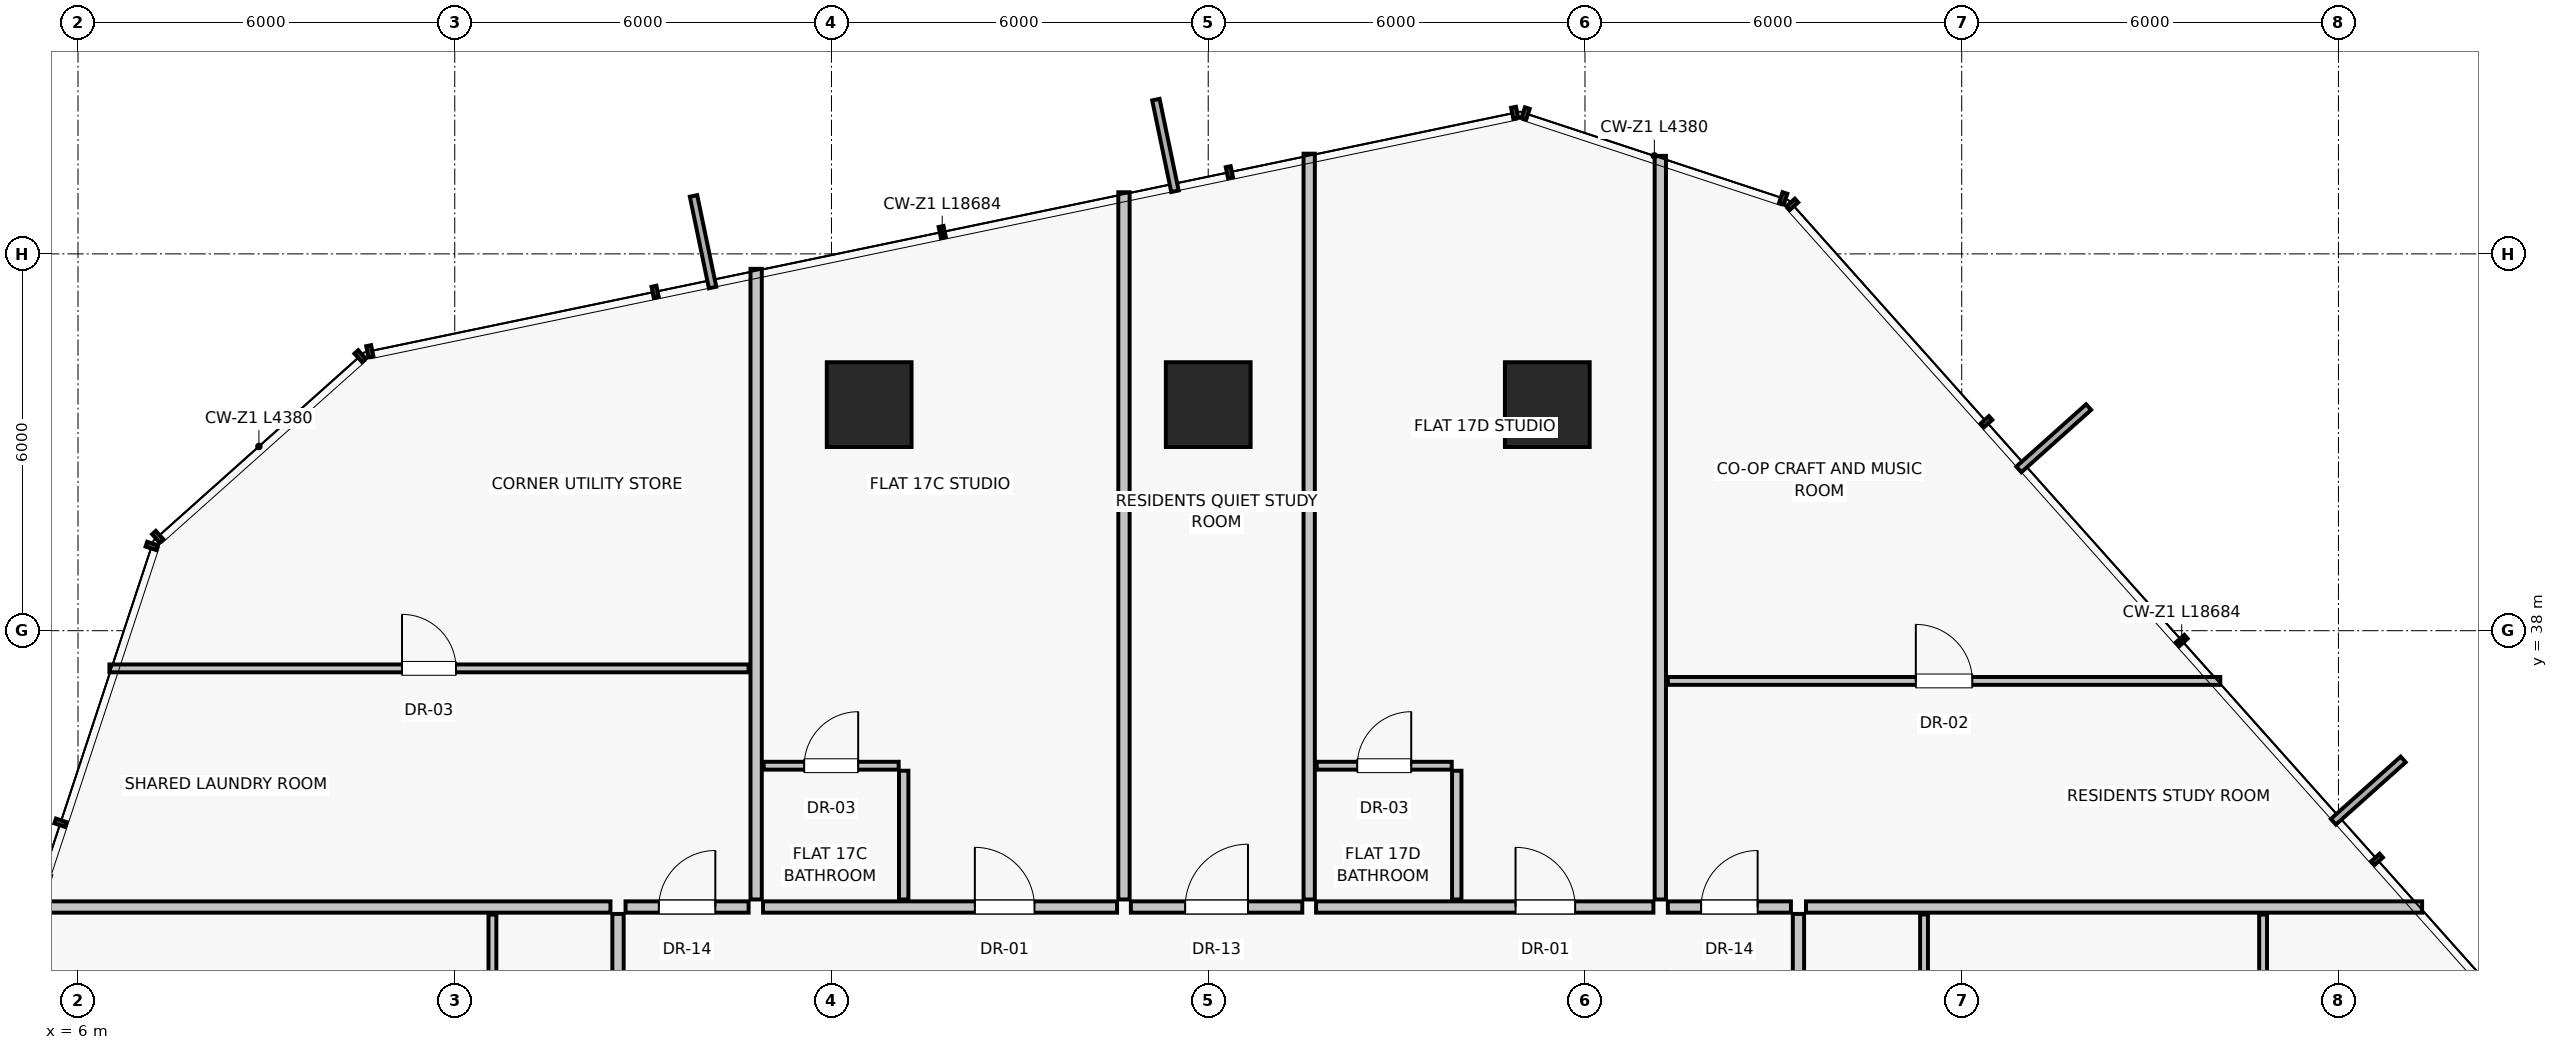
"""IFC4 building model, lengths in metres.
Left out: names, types, materials, properties, quantities, classifications, styles, units other than length and angle.
Written with IfcOpenShell. Run it as: python <this file> out.ifc"""

import sys

from ifc_helpers import new_model, si_unit, direction, frame, frame_2d, origin, origin_2d, place, context, subcontext, project, spatial, rectangle, extrude, source, transform, mapped, element, fill, save


model = new_model("IFC4")
c1 = context("Model", 3, precision=1e-05, world=origin(), true_north=direction((0.0, 1.0)))
c2 = subcontext(c1, "Body", "Model", "MODEL_VIEW")
j1 = project(units=[si_unit("LENGTHUNIT", "METRE"), si_unit("PLANEANGLEUNIT", "RADIAN")], contexts=[c1])
p1 = place(None, origin())
s1 = spatial("IfcSite", under=j1, at=p1, CompositionType="ELEMENT")
p2 = place(p1, origin())
s2 = spatial("IfcBuilding", under=s1, at=p2, CompositionType="ELEMENT")
p3 = place(p2, frame((0.0, 0.0, 64.1)))
s3 = spatial("IfcBuildingStorey", under=s2, at=p3, CompositionType="ELEMENT", Elevation=64.1)
for number, where, z_axis, x_axis in (
    (1, (29.4, 41.6, 0.0), (0.0, 0.0, 1.0), (1.0, 0.0, 0.0)),
    (2, (24.0, 41.6, 0.0), (0.0, 0.0, 1.0), (1.0, 0.0, 0.0)),
    (3, (18.6, 41.6, 0.0), (0.0, 0.0, 1.0), (1.0, 0.0, 0.0)),
):
    element("IfcColumn", number, at=place(p3, frame(where, z_axis=z_axis, x_axis=x_axis)), inside=s3, PredefinedType="COLUMN", context=c2, shape_type="SweptSolid", body=[
        extrude(rectangle(XDim=1.35, YDim=1.35, at=origin_2d()), origin(), (0.0, 0.0, 1.0), 3.25),
    ])
p4 = place(p3, frame((16.8, 33.72, 0.0), z_axis=(0.0, 0.0, 1.0), x_axis=(0.0, 1.0, 0.0)))
e4 = element("IfcWall", 4, at=p4, inside=s3, PredefinedType="PARTITIONING", context=c2, shape_type="SweptSolid", body=[
    extrude(rectangle(XDim=10.042, YDim=0.18, at=frame_2d((5.021, 0.0))), origin(), (0.0, 0.0, 1.0), 3.0),
])
p5 = place(p3, frame((31.2, 33.72, 0.0), z_axis=(0.0, 0.0, 1.0), x_axis=(0.0, 1.0, 0.0)))
e5 = element("IfcWall", 5, at=p5, inside=s3, PredefinedType="PARTITIONING", context=c2, shape_type="SweptSolid", body=[
    extrude(rectangle(XDim=11.841, YDim=0.18, at=frame_2d((5.92, 0.0))), origin(), (0.0, 0.0, 1.0), 3.0),
])
p6 = place(p3, frame((22.768, 33.6, 0.0), z_axis=(0.0, 0.0, 1.0), x_axis=(1.0, 0.0, 0.0)))
e6 = element("IfcWall", 6, at=p6, inside=s3, PredefinedType="PARTITIONING", context=c2, shape_type="SweptSolid", body=[
    extrude(rectangle(XDim=2.73, YDim=0.18, at=frame_2d((1.365, 0.0))), origin(), (0.0, 0.0, 1.0), 3.0),
])
p7 = place(p6, frame((0.865, 0.0, 0.0)))
e7 = element("IfcOpeningElement", 7, at=p7, cuts=e6, PredefinedType="OPENING", context=c2, shape_type="SweptSolid", body=[
    extrude(rectangle(XDim=1.0, YDim=2.01, at=frame_2d((0.5, 1.005))), frame((0.0, 0.1, 0.0), z_axis=(0.0, -1.0, 0.0), x_axis=(1.0, 0.0, 0.0)), (0.0, 0.0, 1.0), 0.2),
])
p8 = place(p3, frame((22.658, 33.72, 0.0), z_axis=(0.0, 0.0, 1.0), x_axis=(0.0, 1.0, 0.0)))
e8 = element("IfcWall", 8, at=p8, inside=s3, PredefinedType="PARTITIONING", context=c2, shape_type="SweptSolid", body=[
    extrude(rectangle(XDim=11.261, YDim=0.18, at=frame_2d((5.631, 0.0))), origin(), (0.0, 0.0, 1.0), 3.0),
])
p9 = place(p3, frame((16.91, 33.6, 0.0), z_axis=(0.0, 0.0, 1.0), x_axis=(1.0, 0.0, 0.0)))
e9 = element("IfcWall", 9, at=p9, inside=s3, PredefinedType="PARTITIONING", context=c2, shape_type="SweptSolid", body=[
    extrude(rectangle(XDim=5.638, YDim=0.18, at=frame_2d((2.819, 0.0))), origin(), (0.0, 0.0, 1.0), 3.0),
])
p10 = place(p9, frame((3.373, 0.0, 0.0)))
e10 = element("IfcOpeningElement", 10, at=p10, cuts=e9, PredefinedType="OPENING", context=c2, shape_type="SweptSolid", body=[
    extrude(rectangle(XDim=0.95, YDim=2.02, at=frame_2d((0.475, 1.01))), frame((0.0, 0.1, 0.0), z_axis=(0.0, -1.0, 0.0), x_axis=(1.0, 0.0, 0.0)), (0.0, 0.0, 1.0), 0.2),
])
p11 = place(p3, frame((19.15, 33.72, 0.0), z_axis=(0.0, 0.0, 1.0), x_axis=(0.0, 1.0, 0.0)))
e11 = element("IfcWall", 11, at=p11, inside=s3, PredefinedType="PARTITIONING", context=c2, shape_type="SweptSolid", body=[
    extrude(rectangle(XDim=2.05, YDim=0.15, at=frame_2d((1.025, 0.0))), origin(), (0.0, 0.0, 1.0), 3.0),
])
p12 = place(p3, frame((16.92, 35.85, 0.0), z_axis=(0.0, 0.0, 1.0), x_axis=(1.0, 0.0, 0.0)))
e12 = element("IfcWall", 12, at=p12, inside=s3, PredefinedType="PARTITIONING", context=c2, shape_type="SweptSolid", body=[
    extrude(rectangle(XDim=2.15, YDim=0.125, at=frame_2d((1.075, 0.0))), origin(), (0.0, 0.0, 1.0), 3.0),
])
p13 = place(p12, frame((0.645, 0.0, 0.0)))
e13 = element("IfcOpeningElement", 13, at=p13, cuts=e12, PredefinedType="OPENING", context=c2, shape_type="SweptSolid", body=[
    extrude(rectangle(XDim=0.86, YDim=2.01, at=frame_2d((0.43, 1.005))), frame((0.0, 0.073, 0.0), z_axis=(0.0, -1.0, 0.0), x_axis=(1.0, 0.0, 0.0)), (0.0, 0.0, 1.0), 0.145),
])
p14 = place(p3, frame((25.608, 33.72, 0.0), z_axis=(0.0, 0.0, 1.0), x_axis=(0.0, 1.0, 0.0)))
e14 = element("IfcWall", 14, at=p14, inside=s3, PredefinedType="PARTITIONING", context=c2, shape_type="SweptSolid", body=[
    extrude(rectangle(XDim=11.876, YDim=0.18, at=frame_2d((5.938, 0.0))), origin(), (0.0, 0.0, 1.0), 3.0),
])
p15 = place(p3, frame((25.718, 33.6, 0.0), z_axis=(0.0, 0.0, 1.0), x_axis=(1.0, 0.0, 0.0)))
e15 = element("IfcWall", 15, at=p15, inside=s3, PredefinedType="PARTITIONING", context=c2, shape_type="SweptSolid", body=[
    extrude(rectangle(XDim=5.372, YDim=0.18, at=frame_2d((2.686, 0.0))), origin(), (0.0, 0.0, 1.0), 3.0),
])
p16 = place(p15, frame((3.176, 0.0, 0.0)))
e16 = element("IfcOpeningElement", 16, at=p16, cuts=e15, PredefinedType="OPENING", context=c2, shape_type="SweptSolid", body=[
    extrude(rectangle(XDim=0.95, YDim=2.02, at=frame_2d((0.475, 1.01))), frame((0.0, 0.1, 0.0), z_axis=(0.0, -1.0, 0.0), x_axis=(1.0, 0.0, 0.0)), (0.0, 0.0, 1.0), 0.2),
])
p17 = place(p3, frame((27.958, 33.72, 0.0), z_axis=(0.0, 0.0, 1.0), x_axis=(0.0, 1.0, 0.0)))
e17 = element("IfcWall", 17, at=p17, inside=s3, PredefinedType="PARTITIONING", context=c2, shape_type="SweptSolid", body=[
    extrude(rectangle(XDim=2.05, YDim=0.15, at=frame_2d((1.025, 0.0))), origin(), (0.0, 0.0, 1.0), 3.0),
])
p18 = place(p3, frame((25.728, 35.85, 0.0), z_axis=(0.0, 0.0, 1.0), x_axis=(1.0, 0.0, 0.0)))
e18 = element("IfcWall", 18, at=p18, inside=s3, PredefinedType="PARTITIONING", context=c2, shape_type="SweptSolid", body=[
    extrude(rectangle(XDim=2.15, YDim=0.125, at=frame_2d((1.075, 0.0))), origin(), (0.0, 0.0, 1.0), 3.0),
])
p19 = place(p18, frame((0.645, 0.0, 0.0)))
e19 = element("IfcOpeningElement", 19, at=p19, cuts=e18, PredefinedType="OPENING", context=c2, shape_type="SweptSolid", body=[
    extrude(rectangle(XDim=0.86, YDim=2.01, at=frame_2d((0.43, 1.005))), frame((0.0, 0.073, 0.0), z_axis=(0.0, -1.0, 0.0), x_axis=(1.0, 0.0, 0.0)), (0.0, 0.0, 1.0), 0.145),
])
p20 = place(p3, frame((14.48, 33.6, 0.0), z_axis=(0.0, 0.0, 1.0), x_axis=(-1.0, 0.0, 0.0)))
e20 = element("IfcWall", 20, at=p20, inside=s3, PredefinedType="PARTITIONING", context=c2, shape_type="SweptSolid", body=[
    extrude(rectangle(XDim=9.232, YDim=0.18, at=frame_2d((4.616, 0.0))), origin(), (0.0, 0.0, 1.0), 3.0),
])
p21 = place(p3, frame((14.6, 25.968, 0.0), z_axis=(0.0, 0.0, 1.0), x_axis=(0.0, 1.0, 0.0)))
e21 = element("IfcWall", 21, at=p21, inside=s3, PredefinedType="PARTITIONING", context=c2, shape_type="SweptSolid", body=[
    extrude(rectangle(XDim=7.522, YDim=0.18, at=frame_2d((3.761, 0.0))), origin(), (0.0, 0.0, 1.0), 3.0),
])
p22 = place(p21, frame((2.64, 0.0, 0.0)))
e22 = element("IfcOpeningElement", 22, at=p22, cuts=e21, PredefinedType="OPENING", context=c2, shape_type="SweptSolid", body=[
    extrude(rectangle(XDim=0.95, YDim=2.02, at=frame_2d((0.475, 1.01))), frame((0.0, 0.1, 0.0), z_axis=(0.0, -1.0, 0.0), x_axis=(1.0, 0.0, 0.0)), (0.0, 0.0, 1.0), 0.2),
])
p23 = place(p3, frame((12.6, 30.158, 0.0), z_axis=(0.0, 0.0, 1.0), x_axis=(0.0, 1.0, 0.0)))
e23 = element("IfcWall", 23, at=p23, inside=s3, PredefinedType="PARTITIONING", context=c2, shape_type="SweptSolid", body=[
    extrude(rectangle(XDim=3.322, YDim=0.125, at=frame_2d((1.661, 0.0))), origin(), (0.0, 0.0, 1.0), 3.0),
])
p24 = place(p3, frame((33.52, 33.6, 0.0), z_axis=(0.0, 0.0, 1.0), x_axis=(1.0, 0.0, 0.0)))
e24 = element("IfcWall", 24, at=p24, inside=s3, PredefinedType="PARTITIONING", context=c2, shape_type="SweptSolid", body=[
    extrude(rectangle(XDim=9.812, YDim=0.18, at=frame_2d((4.906, 0.0))), origin(), (0.0, 0.0, 1.0), 3.0),
])
p25 = place(p3, frame((33.4, 18.71, 0.0), z_axis=(0.0, 0.0, 1.0), x_axis=(0.0, 1.0, 0.0)))
e25 = element("IfcWall", 25, at=p25, inside=s3, PredefinedType="PARTITIONING", context=c2, shape_type="SweptSolid", body=[
    extrude(rectangle(XDim=14.78, YDim=0.18, at=frame_2d((7.39, 0.0))), origin(), (0.0, 0.0, 1.0), 3.0),
])
p26 = place(p25, frame((5.94, 0.0, 0.0)))
e26 = element("IfcOpeningElement", 26, at=p26, cuts=e25, PredefinedType="OPENING", context=c2, shape_type="SweptSolid", body=[
    extrude(rectangle(XDim=0.95, YDim=2.02, at=frame_2d((0.475, 1.01))), frame((0.0, 0.1, 0.0), z_axis=(0.0, -1.0, 0.0), x_axis=(1.0, 0.0, 0.0)), (0.0, 0.0, 1.0), 0.2),
])
for number, where, z_axis, x_axis in (
    (27, (40.8, 29.5, 0.0), (0.0, 0.0, 1.0), (0.0, 1.0, 0.0)),
    (28, (35.4, 29.5, 0.0), (0.0, 0.0, 1.0), (0.0, 1.0, 0.0)),
):
    element("IfcWall", number, at=place(p3, frame(where, z_axis=z_axis, x_axis=x_axis)), inside=s3, PredefinedType="PARTITIONING", context=c2, shape_type="SweptSolid", body=[
        extrude(rectangle(XDim=3.98, YDim=0.125, at=frame_2d((1.99, 0.0))), origin(), (0.0, 0.0, 1.0), 3.0),
    ])
p27 = place(p3, frame((14.72, 33.6, 0.0), z_axis=(0.0, 0.0, 1.0), x_axis=(1.0, 0.0, 0.0)))
e29 = element("IfcWall", 29, at=p27, inside=s3, PredefinedType="PARTITIONING", context=c2, shape_type="SweptSolid", body=[
    extrude(rectangle(XDim=1.96, YDim=0.18, at=frame_2d((0.98, 0.0))), origin(), (0.0, 0.0, 1.0), 3.0),
])
p28 = place(p27, frame((0.53, 0.0, 0.0)))
e30 = element("IfcOpeningElement", 30, at=p28, cuts=e29, PredefinedType="OPENING", context=c2, shape_type="SweptSolid", body=[
    extrude(rectangle(XDim=0.9, YDim=2.01, at=frame_2d((0.45, 1.005))), frame((0.0, 0.1, 0.0), z_axis=(0.0, -1.0, 0.0), x_axis=(1.0, 0.0, 0.0)), (0.0, 0.0, 1.0), 0.2),
])
p29 = place(p3, frame((6.5, 37.4, 0.0), z_axis=(0.0, 0.0, 1.0), x_axis=(1.0, 0.0, 0.0)))
e31 = element("IfcWall", 31, at=p29, inside=s3, PredefinedType="PARTITIONING", context=c2, shape_type="SweptSolid", body=[
    extrude(rectangle(XDim=10.18, YDim=0.125, at=frame_2d((5.09, 0.0))), origin(), (0.0, 0.0, 1.0), 3.0),
])
p30 = place(p29, frame((4.66, 0.0, 0.0)))
e32 = element("IfcOpeningElement", 32, at=p30, cuts=e31, PredefinedType="OPENING", context=c2, shape_type="SweptSolid", body=[
    extrude(rectangle(XDim=0.86, YDim=2.01, at=frame_2d((0.43, 1.005))), frame((0.0, 0.073, 0.0), z_axis=(0.0, -1.0, 0.0), x_axis=(1.0, 0.0, 0.0)), (0.0, 0.0, 1.0), 0.145),
])
p31 = place(p3, frame((31.32, 33.6, 0.0), z_axis=(0.0, 0.0, 1.0), x_axis=(1.0, 0.0, 0.0)))
e33 = element("IfcWall", 33, at=p31, inside=s3, PredefinedType="PARTITIONING", context=c2, shape_type="SweptSolid", body=[
    extrude(rectangle(XDim=1.96, YDim=0.18, at=frame_2d((0.98, 0.0))), origin(), (0.0, 0.0, 1.0), 3.0),
])
p32 = place(p31, frame((0.53, 0.0, 0.0)))
e34 = element("IfcOpeningElement", 34, at=p32, cuts=e33, PredefinedType="OPENING", context=c2, shape_type="SweptSolid", body=[
    extrude(rectangle(XDim=0.9, YDim=2.01, at=frame_2d((0.45, 1.005))), frame((0.0, 0.1, 0.0), z_axis=(0.0, -1.0, 0.0), x_axis=(1.0, 0.0, 0.0)), (0.0, 0.0, 1.0), 0.2),
])
p33 = place(p3, frame((31.32, 37.2, 0.0), z_axis=(0.0, 0.0, 1.0), x_axis=(1.0, 0.0, 0.0)))
e35 = element("IfcWall", 35, at=p33, inside=s3, PredefinedType="PARTITIONING", context=c2, shape_type="SweptSolid", body=[
    extrude(rectangle(XDim=8.798, YDim=0.125, at=frame_2d((4.399, 0.0))), origin(), (0.0, 0.0, 1.0), 3.0),
])
p34 = place(p33, frame((3.949, 0.0, 0.0)))
e36 = element("IfcOpeningElement", 36, at=p34, cuts=e35, PredefinedType="OPENING", context=c2, shape_type="SweptSolid", body=[
    extrude(rectangle(XDim=0.9, YDim=2.01, at=frame_2d((0.45, 1.005))), frame((0.0, 0.073, 0.0), z_axis=(0.0, -1.0, 0.0), x_axis=(1.0, 0.0, 0.0)), (0.0, 0.0, 1.0), 0.145),
])
m1 = source(origin(), c2, "Body", "SweptSolid", [
    extrude(rectangle(XDim=1.0, YDim=2.01, at=frame_2d((0.5, 1.005))), frame((0.0, 0.025, 0.0), z_axis=(0.0, -1.0, 0.0), x_axis=(1.0, 0.0, 0.0)), (0.0, 0.0, 1.0), 0.05),
])
p35 = place(p7, origin())
e37 = element("IfcDoor", 37, at=p35, inside=s3, OperationType="SINGLE_SWING_RIGHT", PredefinedType="DOOR", context=c2, shape_type="MappedRepresentation", body=[
    mapped(m1, transform((0.0, 0.0, 0.0), scale=1.0)),
])
fill(e7, e37)
m2 = source(origin(), c2, "Body", "SweptSolid", [
    extrude(rectangle(XDim=0.95, YDim=2.02, at=frame_2d((0.475, 1.01))), frame((0.0, 0.025, 0.0), z_axis=(0.0, -1.0, 0.0), x_axis=(1.0, 0.0, 0.0)), (0.0, 0.0, 1.0), 0.05),
])
p36 = place(p10, origin())
e38 = element("IfcDoor", 38, at=p36, inside=s3, OperationType="SINGLE_SWING_LEFT", PredefinedType="DOOR", context=c2, shape_type="MappedRepresentation", body=[
    mapped(m2, transform((0.0, 0.0, 0.0), scale=1.0)),
])
fill(e10, e38)
m3 = source(origin(), c2, "Body", "SweptSolid", [
    extrude(rectangle(XDim=0.86, YDim=2.01, at=frame_2d((0.43, 1.005))), frame((0.0, 0.025, 0.0), z_axis=(0.0, -1.0, 0.0), x_axis=(1.0, 0.0, 0.0)), (0.0, 0.0, 1.0), 0.05),
])
p37 = place(p13, origin())
e39 = element("IfcDoor", 39, at=p37, inside=s3, OperationType="SINGLE_SWING_RIGHT", PredefinedType="DOOR", context=c2, shape_type="MappedRepresentation", body=[
    mapped(m3, transform((0.0, 0.0, 0.0), scale=1.0)),
])
fill(e13, e39)
p38 = place(p16, origin())
e40 = element("IfcDoor", 40, at=p38, inside=s3, OperationType="SINGLE_SWING_LEFT", PredefinedType="DOOR", context=c2, shape_type="MappedRepresentation", body=[
    mapped(m2, transform((0.0, 0.0, 0.0), scale=1.0)),
])
fill(e16, e40)
p39 = place(p19, origin())
e41 = element("IfcDoor", 41, at=p39, inside=s3, OperationType="SINGLE_SWING_RIGHT", PredefinedType="DOOR", context=c2, shape_type="MappedRepresentation", body=[
    mapped(m3, transform((0.0, 0.0, 0.0), scale=1.0)),
])
fill(e19, e41)
m4 = source(origin(), c2, "Body", "SweptSolid", [
    extrude(rectangle(XDim=0.9, YDim=2.01, at=frame_2d((0.45, 1.005))), frame((0.0, 0.025, 0.0), z_axis=(0.0, -1.0, 0.0), x_axis=(1.0, 0.0, 0.0)), (0.0, 0.0, 1.0), 0.05),
])
p40 = place(p28, origin())
e42 = element("IfcDoor", 42, at=p40, inside=s3, OperationType="SINGLE_SWING_RIGHT", PredefinedType="DOOR", context=c2, shape_type="MappedRepresentation", body=[
    mapped(m4, transform((0.0, 0.0, 0.0), scale=1.0)),
])
fill(e30, e42)
p41 = place(p30, origin())
e43 = element("IfcDoor", 43, at=p41, inside=s3, OperationType="SINGLE_SWING_LEFT", PredefinedType="DOOR", context=c2, shape_type="MappedRepresentation", body=[
    mapped(m3, transform((0.0, 0.0, 0.0), scale=1.0)),
])
fill(e32, e43)
p42 = place(p32, origin())
e44 = element("IfcDoor", 44, at=p42, inside=s3, OperationType="SINGLE_SWING_RIGHT", PredefinedType="DOOR", context=c2, shape_type="MappedRepresentation", body=[
    mapped(m4, transform((0.0, 0.0, 0.0), scale=1.0)),
])
fill(e34, e44)
p43 = place(p34, origin())
e45 = element("IfcDoor", 45, at=p43, inside=s3, OperationType="SINGLE_SWING_LEFT", PredefinedType="DOOR", context=c2, shape_type="MappedRepresentation", body=[
    mapped(m4, transform((0.0, 0.0, 0.0), scale=1.0)),
])
fill(e36, e45)
save(model, sys.argv[1])
